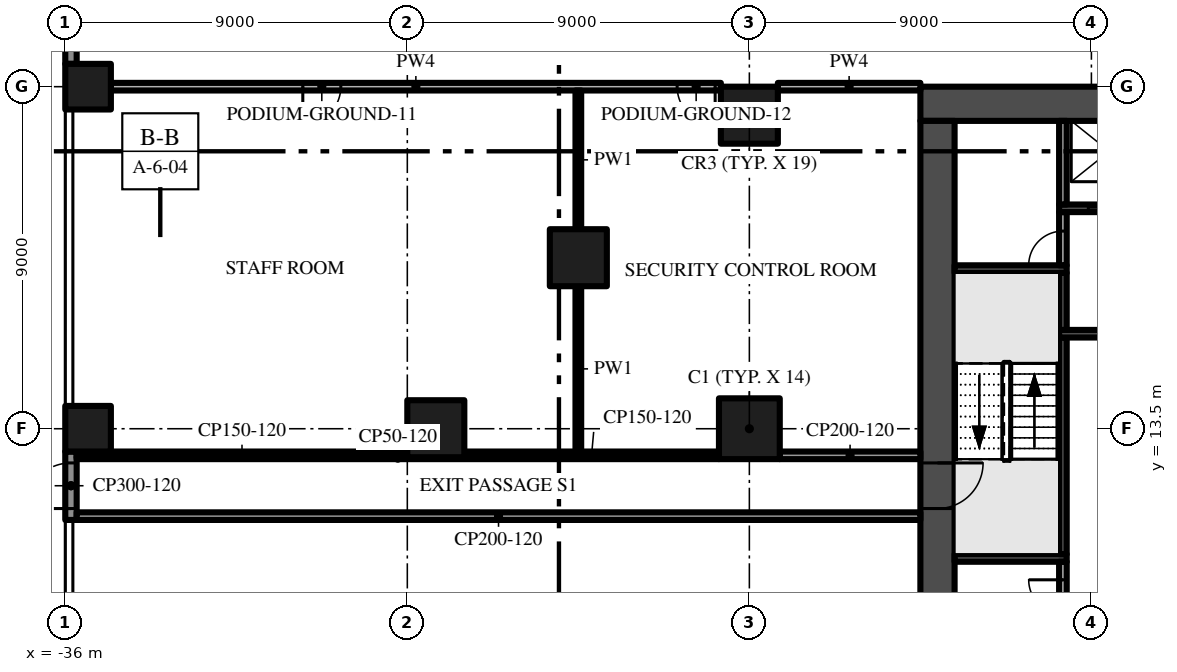
"""IFC4 building model, lengths in metres.
Left out: names, types, materials, properties, quantities, classifications, styles, units other than length and angle.
Written with IfcOpenShell. Run it as: python <this file> out.ifc"""

import sys

from ifc_helpers import new_model, si_unit, direction, frame, frame_2d, origin, origin_2d, place, context, subcontext, project, spatial, rectangle, extrude, element, fill, save


model = new_model("IFC4")
c1 = context("Model", 3, precision=1e-05, world=origin(), true_north=direction((0.0, 1.0)))
c2 = subcontext(c1, "Body", "Model", "MODEL_VIEW")
j1 = project(units=[si_unit("LENGTHUNIT", "METRE"), si_unit("PLANEANGLEUNIT", "RADIAN")], contexts=[c1])
p1 = place(None, origin())
s1 = spatial("IfcSite", under=j1, at=p1, CompositionType="ELEMENT")
p2 = place(p1, origin())
s2 = spatial("IfcBuilding", under=s1, at=p2, CompositionType="ELEMENT")
p3 = place(p2, origin())
s3 = spatial("IfcBuildingStorey", under=s2, at=p3, CompositionType="ELEMENT", Elevation=0.0)
p4 = place(p3, frame((13.5, 22.05, -2.2), z_axis=(0.0, 0.0, 1.0), x_axis=(-1.0, 0.0, 0.0)))
e1 = element("IfcWall", 1, at=p4, inside=s3, PredefinedType="SHEAR", context=c2, shape_type="SweptSolid", body=[
    extrude(rectangle(XDim=27.0, YDim=0.9, at=frame_2d((13.5, 0.0))), origin(), (0.0, 0.0, 1.0), 7.8),
])
p5 = place(p3, frame((-13.05, 21.6, -2.2), z_axis=(0.0, 0.0, 1.0), x_axis=(0.0, -1.0, 0.0)))
e2 = element("IfcWall", 2, at=p5, inside=s3, PredefinedType="SHEAR", context=c2, shape_type="SweptSolid", body=[
    extrude(rectangle(XDim=16.2, YDim=0.9, at=frame_2d((8.1, 0.0))), origin(), (0.0, 0.0, 1.0), 7.8),
])
p6 = place(p5, frame((9.0, 0.0, 2.2)))
e3 = element("IfcOpeningElement", 3, at=p6, cuts=e2, PredefinedType="OPENING", context=c2, shape_type="SweptSolid", body=[
    extrude(rectangle(XDim=1.2, YDim=2.2, at=frame_2d((0.6, 1.1))), frame((0.0, 0.46, 0.0), z_axis=(0.0, -1.0, 0.0), x_axis=(1.0, 0.0, 0.0)), (0.0, 0.0, 1.0), 0.92),
])
for number, where, z_axis, x_axis in (
    (4, (-35.4, 13.5, 0.0), (0.0, 0.0, 1.0), (1.0, 0.0, 0.0)),
    (5, (-35.4, 22.5, 0.0), (0.0, 0.0, 1.0), (1.0, 0.0, 0.0)),
):
    element("IfcColumn", number, at=place(p3, frame(where, z_axis=z_axis, x_axis=x_axis)), inside=s3, PredefinedType="COLUMN", context=c2, shape_type="SweptSolid", body=[
        extrude(rectangle(XDim=1.2, YDim=1.2, at=origin_2d()), origin(), (0.0, 0.0, 1.0), 5.6),
    ])
p7 = place(p3, frame((-18.0, 13.5, 0.0), z_axis=(0.0, 0.0, 1.0), x_axis=(1.0, 0.0, 0.0)))
e6 = element("IfcColumn", 6, at=p7, inside=s3, PredefinedType="COLUMN", context=c2, shape_type="SweptSolid", body=[
    extrude(rectangle(XDim=1.6, YDim=1.6, at=origin_2d()), origin(), (0.0, 0.0, 1.0), 5.6),
])
for number, where, z_axis, x_axis in (
    (7, (-18.0, 21.75, 0.0), (0.0, 0.0, 1.0), (1.0, 0.0, 0.0)),
    (8, (-26.25, 13.5, 0.0), (0.0, 0.0, 1.0), (1.0, 0.0, 0.0)),
    (9, (-22.5, 18.0, 0.0), (0.0, 0.0, 1.0), (1.0, 0.0, 0.0)),
):
    element("IfcColumn", number, at=place(p3, frame(where, z_axis=z_axis, x_axis=x_axis)), inside=s3, PredefinedType="COLUMN", context=c2, shape_type="SweptSolid", body=[
        extrude(rectangle(XDim=1.5, YDim=1.5, at=origin_2d()), origin(), (0.0, 0.0, 1.0), 5.6),
    ])
p8 = place(p3, frame((-35.85, 23.1, 0.0), z_axis=(0.0, 0.0, 1.0), x_axis=(0.0, 1.0, 0.0)))
e10 = element("IfcWall", 10, at=p8, inside=s3, PredefinedType="SOLIDWALL", context=c2, shape_type="SweptSolid", body=[
    extrude(rectangle(XDim=2.15, YDim=0.3, at=frame_2d((1.075, 0.0))), origin(), (0.0, 0.0, 1.0), 5.6),
])
p9 = place(p8, frame((0.55, 0.0, 0.0)))
e11 = element("IfcOpeningElement", 11, at=p9, cuts=e10, PredefinedType="OPENING", context=c2, shape_type="SweptSolid", body=[
    extrude(rectangle(XDim=1.2, YDim=2.4, at=frame_2d((0.6, 1.2))), frame((0.0, 0.16, 0.0), z_axis=(0.0, -1.0, 0.0), x_axis=(1.0, 0.0, 0.0)), (0.0, 0.0, 1.0), 0.32),
])
for number, where, z_axis, x_axis in (
    (12, (-12.6, 10.1, -0.4), (0.0, 0.0, 1.0), (1.0, 0.0, 0.0)),
    (13, (-12.6, 17.7, -0.4), (0.0, 0.0, 1.0), (1.0, 0.0, 0.0)),
):
    element("IfcWall", number, at=place(p3, frame(where, z_axis=z_axis, x_axis=x_axis)), inside=s3, PredefinedType="SHEAR", context=c2, shape_type="SweptSolid", body=[
        extrude(rectangle(XDim=2.95, YDim=0.2, at=frame_2d((1.475, 0.0))), origin(), (0.0, 0.0, 1.0), 6.0),
    ])
p10 = place(p3, frame((-9.75, 8.15, 0.0), z_axis=(0.0, 0.0, 1.0), x_axis=(0.0, 1.0, 0.0)))
e14 = element("IfcWall", 14, at=p10, inside=s3, PredefinedType="PARTITIONING", context=c2, shape_type="SweptSolid", body=[
    extrude(rectangle(XDim=1.85, YDim=0.2, at=frame_2d((0.925, 0.0))), origin(), (0.0, 0.0, 1.0), 5.6),
])
p11 = place(p10, frame((0.475, 0.0, 0.0)))
e15 = element("IfcOpeningElement", 15, at=p11, cuts=e14, PredefinedType="OPENING", context=c2, shape_type="SweptSolid", body=[
    extrude(rectangle(XDim=0.9, YDim=2.1, at=frame_2d((0.45, 1.05))), frame((0.0, 0.11, 0.0), z_axis=(0.0, -1.0, 0.0), x_axis=(1.0, 0.0, 0.0)), (0.0, 0.0, 1.0), 0.22),
])
p12 = place(p3, frame((-9.75, 10.2, -0.4), z_axis=(0.0, 0.0, 1.0), x_axis=(0.0, 1.0, 0.0)))
e16 = element("IfcWall", 16, at=p12, inside=s3, PredefinedType="SHEAR", context=c2, shape_type="SweptSolid", body=[
    extrude(rectangle(XDim=5.7, YDim=0.2, at=frame_2d((2.85, 0.0))), origin(), (0.0, 0.0, 1.0), 6.0),
])
p13 = place(p3, frame((-1.5, 16.0, -0.4), z_axis=(0.0, 0.0, 1.0), x_axis=(-1.0, 0.0, 0.0)))
e17 = element("IfcWall", 17, at=p13, inside=s3, PredefinedType="SHEAR", context=c2, shape_type="SweptSolid", body=[
    extrude(rectangle(XDim=8.35, YDim=0.2, at=frame_2d((4.175, 0.0))), origin(), (0.0, 0.0, 1.0), 6.0),
])
p14 = place(p13, frame((3.206, 0.0, 0.4)))
e18 = element("IfcOpeningElement", 18, at=p14, cuts=e17, PredefinedType="OPENING", context=c2, shape_type="SweptSolid", body=[
    extrude(rectangle(XDim=1.1, YDim=2.1, at=frame_2d((0.55, 1.05))), frame((0.0, 0.11, 0.0), z_axis=(0.0, -1.0, 0.0), x_axis=(1.0, 0.0, 0.0)), (0.0, 0.0, 1.0), 0.22),
])
p15 = place(p13, frame((0.769, 0.0, 0.4)))
e19 = element("IfcOpeningElement", 19, at=p15, cuts=e17, PredefinedType="OPENING", context=c2, shape_type="SweptSolid", body=[
    extrude(rectangle(XDim=1.1, YDim=2.1, at=frame_2d((0.55, 1.05))), frame((0.0, 0.11, 0.0), z_axis=(0.0, -1.0, 0.0), x_axis=(1.0, 0.0, 0.0)), (0.0, 0.0, 1.0), 0.22),
])
p16 = place(p13, frame((6.162, 0.0, 0.4)))
e20 = element("IfcOpeningElement", 20, at=p16, cuts=e17, PredefinedType="OPENING", context=c2, shape_type="SweptSolid", body=[
    extrude(rectangle(XDim=0.9, YDim=2.1, at=frame_2d((0.45, 1.05))), frame((0.0, 0.11, 0.0), z_axis=(0.0, -1.0, 0.0), x_axis=(1.0, 0.0, 0.0)), (0.0, 0.0, 1.0), 0.22),
])
p17 = place(p3, frame((-9.75, 16.1, -0.4), z_axis=(0.0, 0.0, 1.0), x_axis=(0.0, 1.0, 0.0)))
e21 = element("IfcWall", 21, at=p17, inside=s3, PredefinedType="SHEAR", context=c2, shape_type="SweptSolid", body=[
    extrude(rectangle(XDim=1.5, YDim=0.2, at=frame_2d((0.75, 0.0))), origin(), (0.0, 0.0, 1.0), 6.0),
])
p18 = place(p3, frame((-9.75, 17.8, 0.0), z_axis=(0.0, 0.0, 1.0), x_axis=(0.0, 1.0, 0.0)))
e22 = element("IfcWall", 22, at=p18, inside=s3, PredefinedType="PARTITIONING", context=c2, shape_type="SweptSolid", body=[
    extrude(rectangle(XDim=1.4, YDim=0.2, at=frame_2d((0.7, 0.0))), origin(), (0.0, 0.0, 1.0), 5.6),
])
p19 = place(p18, origin())
e23 = element("IfcOpeningElement", 23, at=p19, cuts=e22, PredefinedType="OPENING", context=c2, shape_type="SweptSolid", body=[
    extrude(rectangle(XDim=0.9, YDim=2.1, at=frame_2d((0.45, 1.05))), frame((0.0, 0.11, 0.0), z_axis=(0.0, -1.0, 0.0), x_axis=(1.0, 0.0, 0.0)), (0.0, 0.0, 1.0), 0.22),
])
p20 = place(p3, frame((-9.85, 19.3, -0.4), z_axis=(0.0, 0.0, 1.0), x_axis=(1.0, 0.0, 0.0)))
e24 = element("IfcWall", 24, at=p20, inside=s3, PredefinedType="SHEAR", context=c2, shape_type="SweptSolid", body=[
    extrude(rectangle(XDim=19.7, YDim=0.2, at=frame_2d((9.85, 0.0))), origin(), (0.0, 0.0, 1.0), 6.0),
])
p21 = place(p20, frame((0.769, 0.0, 0.4)))
e25 = element("IfcOpeningElement", 25, at=p21, cuts=e24, PredefinedType="OPENING", context=c2, shape_type="SweptSolid", body=[
    extrude(rectangle(XDim=1.1, YDim=2.1, at=frame_2d((0.55, 1.05))), frame((0.0, 0.11, 0.0), z_axis=(0.0, -1.0, 0.0), x_axis=(1.0, 0.0, 0.0)), (0.0, 0.0, 1.0), 0.22),
])
p22 = place(p20, frame((3.206, 0.0, 0.4)))
e26 = element("IfcOpeningElement", 26, at=p22, cuts=e24, PredefinedType="OPENING", context=c2, shape_type="SweptSolid", body=[
    extrude(rectangle(XDim=1.1, YDim=2.1, at=frame_2d((0.55, 1.05))), frame((0.0, 0.11, 0.0), z_axis=(0.0, -1.0, 0.0), x_axis=(1.0, 0.0, 0.0)), (0.0, 0.0, 1.0), 0.22),
])
p23 = place(p20, frame((5.644, 0.0, 0.4)))
e27 = element("IfcOpeningElement", 27, at=p23, cuts=e24, PredefinedType="OPENING", context=c2, shape_type="SweptSolid", body=[
    extrude(rectangle(XDim=1.1, YDim=2.1, at=frame_2d((0.55, 1.05))), frame((0.0, 0.11, 0.0), z_axis=(0.0, -1.0, 0.0), x_axis=(1.0, 0.0, 0.0)), (0.0, 0.0, 1.0), 0.22),
])
p24 = place(p20, frame((8.081, 0.0, 0.4)))
e28 = element("IfcOpeningElement", 28, at=p24, cuts=e24, PredefinedType="OPENING", context=c2, shape_type="SweptSolid", body=[
    extrude(rectangle(XDim=1.1, YDim=2.1, at=frame_2d((0.55, 1.05))), frame((0.0, 0.11, 0.0), z_axis=(0.0, -1.0, 0.0), x_axis=(1.0, 0.0, 0.0)), (0.0, 0.0, 1.0), 0.22),
])
p25 = place(p20, frame((10.519, 0.0, 0.4)))
e29 = element("IfcOpeningElement", 29, at=p25, cuts=e24, PredefinedType="OPENING", context=c2, shape_type="SweptSolid", body=[
    extrude(rectangle(XDim=1.1, YDim=2.1, at=frame_2d((0.55, 1.05))), frame((0.0, 0.11, 0.0), z_axis=(0.0, -1.0, 0.0), x_axis=(1.0, 0.0, 0.0)), (0.0, 0.0, 1.0), 0.22),
])
p26 = place(p20, frame((12.956, 0.0, 0.4)))
e30 = element("IfcOpeningElement", 30, at=p26, cuts=e24, PredefinedType="OPENING", context=c2, shape_type="SweptSolid", body=[
    extrude(rectangle(XDim=1.1, YDim=2.1, at=frame_2d((0.55, 1.05))), frame((0.0, 0.11, 0.0), z_axis=(0.0, -1.0, 0.0), x_axis=(1.0, 0.0, 0.0)), (0.0, 0.0, 1.0), 0.22),
])
p27 = place(p20, frame((15.394, 0.0, 0.4)))
e31 = element("IfcOpeningElement", 31, at=p27, cuts=e24, PredefinedType="OPENING", context=c2, shape_type="SweptSolid", body=[
    extrude(rectangle(XDim=1.1, YDim=2.1, at=frame_2d((0.55, 1.05))), frame((0.0, 0.11, 0.0), z_axis=(0.0, -1.0, 0.0), x_axis=(1.0, 0.0, 0.0)), (0.0, 0.0, 1.0), 0.22),
])
p28 = place(p20, frame((17.831, 0.0, 0.4)))
e32 = element("IfcOpeningElement", 32, at=p28, cuts=e24, PredefinedType="OPENING", context=c2, shape_type="SweptSolid", body=[
    extrude(rectangle(XDim=1.1, YDim=2.1, at=frame_2d((0.55, 1.05))), frame((0.0, 0.11, 0.0), z_axis=(0.0, -1.0, 0.0), x_axis=(1.0, 0.0, 0.0)), (0.0, 0.0, 1.0), 0.22),
])
p29 = place(p3, frame((-9.75, 19.4, -0.4), z_axis=(0.0, 0.0, 1.0), x_axis=(0.0, 1.0, 0.0)))
e33 = element("IfcWall", 33, at=p29, inside=s3, PredefinedType="PARTITIONING", context=c2, shape_type="SweptSolid", body=[
    extrude(rectangle(XDim=2.2, YDim=0.2, at=frame_2d((1.1, 0.0))), origin(), (0.0, 0.0, 1.0), 6.0),
])
p30 = place(p3, frame((-35.7, 11.2, 0.0), z_axis=(0.0, 0.0, 1.0), x_axis=(1.0, 0.0, 0.0)))
e34 = element("IfcWall", 34, at=p30, inside=s3, PredefinedType="PARTITIONING", context=c2, shape_type="SweptSolid", body=[
    extrude(rectangle(XDim=22.2, YDim=0.2, at=frame_2d((11.1, 0.0))), origin(), (0.0, 0.0, 1.0), 5.6),
])
p31 = place(p3, frame((-35.7, 12.725, 0.0), z_axis=(0.0, 0.0, 1.0), x_axis=(1.0, 0.0, 0.0)))
e35 = element("IfcWall", 35, at=p31, inside=s3, PredefinedType="PARTITIONING", context=c2, shape_type="SweptSolid", body=[
    extrude(rectangle(XDim=16.9, YDim=0.05, at=frame_2d((8.45, 0.0))), origin(), (0.0, 0.0, 1.0), 5.6),
])
p32 = place(p3, frame((-35.7, 12.825, 0.0), z_axis=(0.0, 0.0, 1.0), x_axis=(1.0, 0.0, 0.0)))
e36 = element("IfcWall", 36, at=p32, inside=s3, PredefinedType="PARTITIONING", context=c2, shape_type="SweptSolid", body=[
    extrude(rectangle(XDim=8.7, YDim=0.15, at=frame_2d((4.35, 0.0))), origin(), (0.0, 0.0, 1.0), 5.6),
])
p33 = place(p3, frame((-25.5, 12.825, 0.0), z_axis=(0.0, 0.0, 1.0), x_axis=(1.0, 0.0, 0.0)))
e37 = element("IfcWall", 37, at=p33, inside=s3, PredefinedType="PARTITIONING", context=c2, shape_type="SweptSolid", body=[
    extrude(rectangle(XDim=6.7, YDim=0.15, at=frame_2d((3.35, 0.0))), origin(), (0.0, 0.0, 1.0), 5.6),
])
p34 = place(p3, frame((-17.2, 12.8, 0.0), z_axis=(0.0, 0.0, 1.0), x_axis=(1.0, 0.0, 0.0)))
e38 = element("IfcWall", 38, at=p34, inside=s3, PredefinedType="PARTITIONING", context=c2, shape_type="SweptSolid", body=[
    extrude(rectangle(XDim=3.7, YDim=0.2, at=frame_2d((1.85, 0.0))), origin(), (0.0, 0.0, 1.0), 5.6),
])
p35 = place(p3, frame((-35.85, 11.1, 0.0), z_axis=(0.0, 0.0, 1.0), x_axis=(0.0, 1.0, 0.0)))
e39 = element("IfcWall", 39, at=p35, inside=s3, PredefinedType="PARTITIONING", context=c2, shape_type="SweptSolid", body=[
    extrude(rectangle(XDim=1.8, YDim=0.3, at=frame_2d((0.9, 0.0))), origin(), (0.0, 0.0, 1.0), 5.6),
])
p36 = place(p35, frame((0.3, 0.0, 0.0)))
e40 = element("IfcOpeningElement", 40, at=p36, cuts=e39, PredefinedType="OPENING", context=c2, shape_type="SweptSolid", body=[
    extrude(rectangle(XDim=1.2, YDim=2.2, at=frame_2d((0.6, 1.1))), frame((0.0, 0.16, 0.0), z_axis=(0.0, -1.0, 0.0), x_axis=(1.0, 0.0, 0.0)), (0.0, 0.0, 1.0), 0.32),
])
p37 = place(p3, frame((-18.75, 22.5, 0.0), z_axis=(0.0, 0.0, 1.0), x_axis=(-1.0, 0.0, 0.0)))
e41 = element("IfcWall", 41, at=p37, inside=s3, PredefinedType="PARTITIONING", context=c2, shape_type="SweptSolid", body=[
    extrude(rectangle(XDim=16.05, YDim=0.2, at=frame_2d((8.025, 0.0))), origin(), (0.0, 0.0, 1.0), 5.6),
])
p38 = place(p37, frame((10.0, 0.0, 0.0)))
e42 = element("IfcOpeningElement", 42, at=p38, cuts=e41, PredefinedType="OPENING", context=c2, shape_type="SweptSolid", body=[
    extrude(rectangle(XDim=1.0, YDim=2.4, at=frame_2d((0.5, 1.2))), frame((0.0, 0.11, 0.0), z_axis=(0.0, -1.0, 0.0), x_axis=(1.0, 0.0, 0.0)), (0.0, 0.0, 1.0), 0.22),
])
p39 = place(p37, frame((0.15, 0.0, 0.0)))
e43 = element("IfcOpeningElement", 43, at=p39, cuts=e41, PredefinedType="OPENING", context=c2, shape_type="SweptSolid", body=[
    extrude(rectangle(XDim=1.0, YDim=2.4, at=frame_2d((0.5, 1.2))), frame((0.0, 0.11, 0.0), z_axis=(0.0, -1.0, 0.0), x_axis=(1.0, 0.0, 0.0)), (0.0, 0.0, 1.0), 0.22),
])
p40 = place(p3, frame((-17.25, 22.5, 0.0), z_axis=(0.0, 0.0, 1.0), x_axis=(1.0, 0.0, 0.0)))
e44 = element("IfcWall", 44, at=p40, inside=s3, PredefinedType="PARTITIONING", context=c2, shape_type="SweptSolid", body=[
    extrude(rectangle(XDim=3.75, YDim=0.2, at=frame_2d((1.875, 0.0))), origin(), (0.0, 0.0, 1.0), 5.6),
])
p41 = place(p3, frame((-22.5, 12.9, 0.0), z_axis=(0.0, 0.0, 1.0), x_axis=(0.0, 1.0, 0.0)))
e45 = element("IfcWall", 45, at=p41, inside=s3, PredefinedType="PARTITIONING", context=c2, shape_type="SweptSolid", body=[
    extrude(rectangle(XDim=4.35, YDim=0.15, at=frame_2d((2.175, 0.0))), origin(), (0.0, 0.0, 1.0), 5.6),
])
p42 = place(p3, frame((-22.5, 18.75, 0.0), z_axis=(0.0, 0.0, 1.0), x_axis=(0.0, 1.0, 0.0)))
e46 = element("IfcWall", 46, at=p42, inside=s3, PredefinedType="PARTITIONING", context=c2, shape_type="SweptSolid", body=[
    extrude(rectangle(XDim=3.65, YDim=0.15, at=frame_2d((1.825, 0.0))), origin(), (0.0, 0.0, 1.0), 5.6),
])
p43 = place(p6, frame((1.2, 0.0, 0.0), z_axis=(0.0, 0.0, 1.0), x_axis=(-1.0, 0.0, 0.0)))
e47 = element("IfcDoor", 47, at=p43, inside=s3, OperationType="SINGLE_SWING_RIGHT", PredefinedType="DOOR", context=c2, shape_type="SweptSolid", body=[
    extrude(rectangle(XDim=1.2, YDim=2.2, at=frame_2d((0.6, 1.1))), frame((0.0, 0.025, 0.0), z_axis=(0.0, -1.0, 0.0), x_axis=(1.0, 0.0, 0.0)), (0.0, 0.0, 1.0), 0.05),
])
fill(e3, e47)
p44 = place(p21, origin())
e48 = element("IfcDoor", 48, at=p44, inside=s3, OperationType="SLIDING_TO_LEFT", PredefinedType="DOOR", context=c2, shape_type="SweptSolid", body=[
    extrude(rectangle(XDim=1.1, YDim=2.1, at=frame_2d((0.55, 1.05))), frame((0.0, 0.025, 0.0), z_axis=(0.0, -1.0, 0.0), x_axis=(1.0, 0.0, 0.0)), (0.0, 0.0, 1.0), 0.05),
])
fill(e25, e48)
p45 = place(p11, origin())
e49 = element("IfcDoor", 49, at=p45, inside=s3, OperationType="SINGLE_SWING_RIGHT", PredefinedType="DOOR", context=c2, shape_type="SweptSolid", body=[
    extrude(rectangle(XDim=0.9, YDim=2.1, at=frame_2d((0.45, 1.05))), frame((0.0, 0.025, 0.0), z_axis=(0.0, -1.0, 0.0), x_axis=(1.0, 0.0, 0.0)), (0.0, 0.0, 1.0), 0.05),
])
fill(e15, e49)
p46 = place(p19, origin())
e50 = element("IfcDoor", 50, at=p46, inside=s3, OperationType="SINGLE_SWING_LEFT", PredefinedType="DOOR", context=c2, shape_type="SweptSolid", body=[
    extrude(rectangle(XDim=0.9, YDim=2.1, at=frame_2d((0.45, 1.05))), frame((0.0, 0.025, 0.0), z_axis=(0.0, -1.0, 0.0), x_axis=(1.0, 0.0, 0.0)), (0.0, 0.0, 1.0), 0.05),
])
fill(e23, e50)
p47 = place(p36, origin())
e51 = element("IfcDoor", 51, at=p47, inside=s3, OperationType="SINGLE_SWING_LEFT", PredefinedType="DOOR", context=c2, shape_type="SweptSolid", body=[
    extrude(rectangle(XDim=1.2, YDim=2.2, at=frame_2d((0.6, 1.1))), frame((0.0, 0.025, 0.0), z_axis=(0.0, -1.0, 0.0), x_axis=(1.0, 0.0, 0.0)), (0.0, 0.0, 1.0), 0.05),
])
fill(e40, e51)
p48 = place(p38, origin())
e52 = element("IfcDoor", 52, at=p48, inside=s3, OperationType="SINGLE_SWING_RIGHT", PredefinedType="DOOR", context=c2, shape_type="SweptSolid", body=[
    extrude(rectangle(XDim=1.0, YDim=2.4, at=frame_2d((0.5, 1.2))), frame((0.0, 0.025, 0.0), z_axis=(0.0, -1.0, 0.0), x_axis=(1.0, 0.0, 0.0)), (0.0, 0.0, 1.0), 0.05),
])
fill(e42, e52)
p49 = place(p39, origin())
e53 = element("IfcDoor", 53, at=p49, inside=s3, OperationType="SINGLE_SWING_LEFT", PredefinedType="DOOR", context=c2, shape_type="SweptSolid", body=[
    extrude(rectangle(XDim=1.0, YDim=2.4, at=frame_2d((0.5, 1.2))), frame((0.0, 0.025, 0.0), z_axis=(0.0, -1.0, 0.0), x_axis=(1.0, 0.0, 0.0)), (0.0, 0.0, 1.0), 0.05),
])
fill(e43, e53)
save(model, sys.argv[1])
